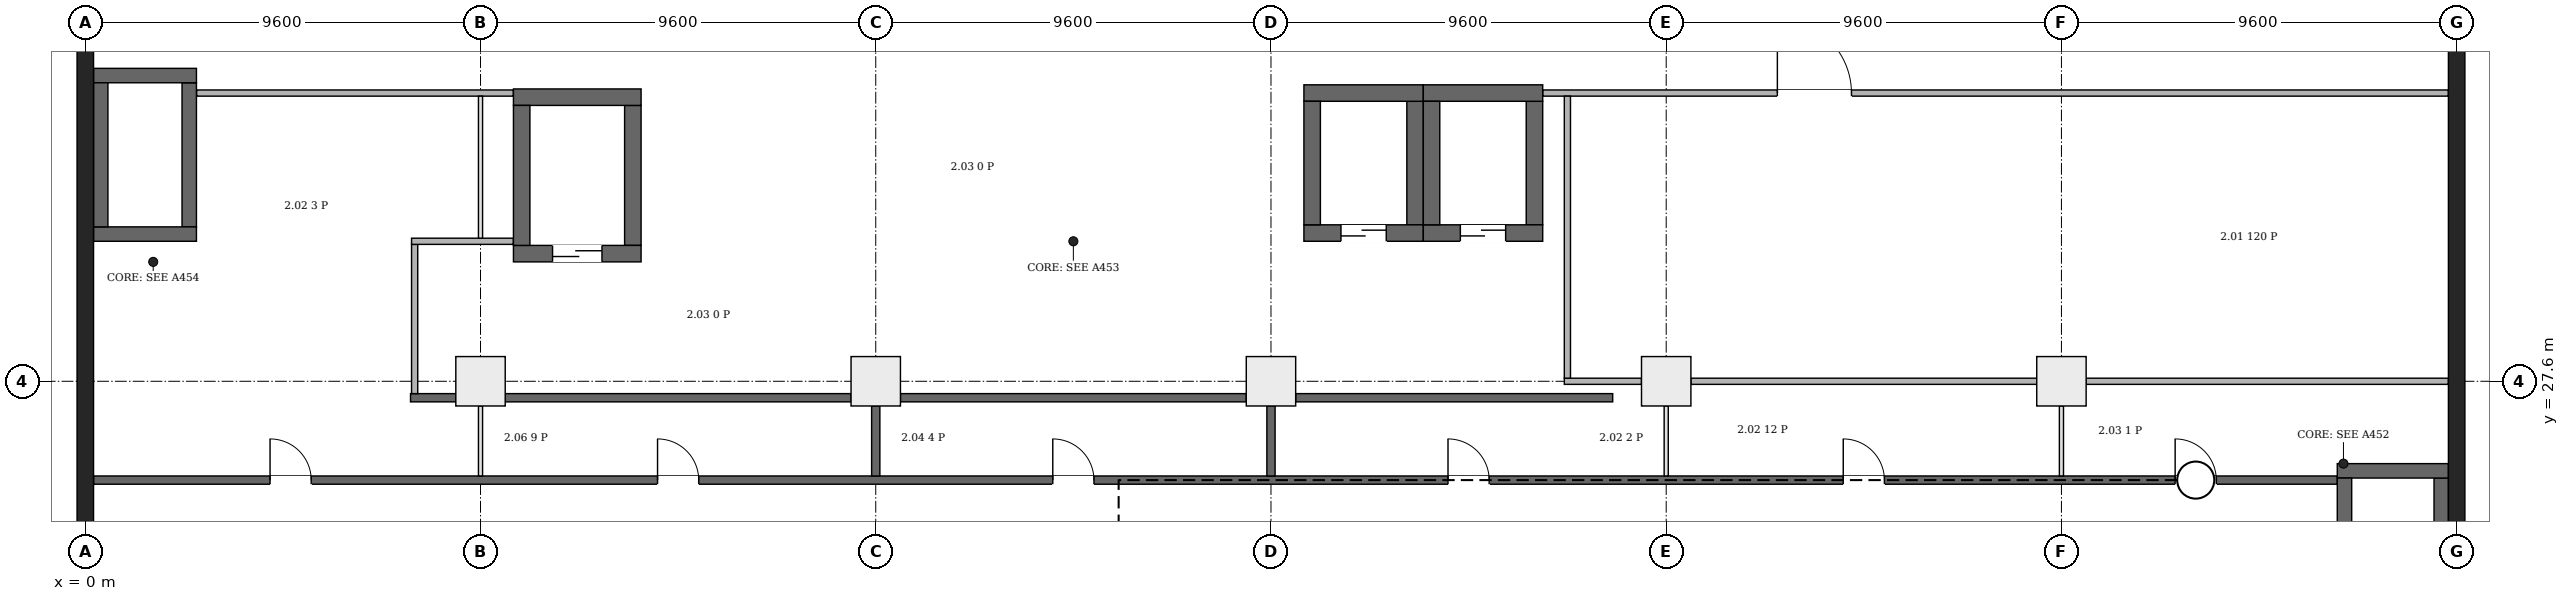
"""IFC4 building model, lengths in metres.
Left out: names, types, materials, properties, quantities, classifications, styles, units other than length and angle.
Written with IfcOpenShell. Run it as: python <this file> out.ifc"""

import sys

from ifc_helpers import new_model, si_unit, direction, frame, frame_2d, origin, origin_2d, place, context, subcontext, project, spatial, rectangle, extrude, element, fill, save


model = new_model("IFC4")
c1 = context("Model", 3, precision=1e-05, world=origin(), true_north=direction((0.0, 1.0)))
c2 = subcontext(c1, "Body", "Model", "MODEL_VIEW")
j1 = project(units=[si_unit("LENGTHUNIT", "METRE"), si_unit("PLANEANGLEUNIT", "RADIAN")], contexts=[c1])
p1 = place(None, origin())
s1 = spatial("IfcSite", under=j1, at=p1, CompositionType="ELEMENT")
p2 = place(p1, origin())
s2 = spatial("IfcBuilding", under=s1, at=p2, CompositionType="ELEMENT")
p3 = place(p2, frame((0.0, 0.0, 14.2)))
s3 = spatial("IfcBuildingStorey", under=s2, at=p3, CompositionType="ELEMENT", Elevation=14.2)
for number, where, z_axis, x_axis in (
    (1, (0.0, -0.2, 0.0), (0.0, 0.0, 1.0), (0.0, 1.0, 0.0)),
    (2, (57.6, -0.2, 0.0), (0.0, 0.0, 1.0), (0.0, 1.0, 0.0)),
):
    element("IfcWall", number, at=place(p3, frame(where, z_axis=z_axis, x_axis=x_axis)), inside=s3, PredefinedType="SHEAR", context=c2, shape_type="SweptSolid", body=[
        extrude(rectangle(XDim=46.88, YDim=0.4, at=frame_2d((23.44, 0.0))), origin(), (0.0, 0.0, 1.0), 7.5),
    ])
for number, where, z_axis, x_axis in (
    (3, (0.2, 31.175, 0.0), (0.0, 0.0, 1.0), (1.0, 0.0, 0.0)),
    (4, (0.2, 35.025, 0.0), (0.0, 0.0, 1.0), (1.0, 0.0, 0.0)),
):
    element("IfcWall", number, at=place(p3, frame(where, z_axis=z_axis, x_axis=x_axis)), inside=s3, PredefinedType="SHEAR", context=c2, shape_type="SweptSolid", body=[
        extrude(rectangle(XDim=2.5, YDim=0.35, at=frame_2d((1.25, 0.0))), origin(), (0.0, 0.0, 1.0), 7.5),
    ])
for number, where, z_axis, x_axis in (
    (5, (0.375, 31.35, 0.0), (0.0, 0.0, 1.0), (0.0, 1.0, 0.0)),
    (6, (2.525, 31.35, 0.0), (0.0, 0.0, 1.0), (0.0, 1.0, 0.0)),
):
    element("IfcWall", number, at=place(p3, frame(where, z_axis=z_axis, x_axis=x_axis)), inside=s3, PredefinedType="SHEAR", context=c2, shape_type="SweptSolid", body=[
        extrude(rectangle(XDim=3.5, YDim=0.35, at=frame_2d((1.75, 0.0))), origin(), (0.0, 0.0, 1.0), 7.5),
    ])
p4 = place(p3, frame((54.7, 25.425, 0.0), z_axis=(0.0, 0.0, 1.0), x_axis=(1.0, 0.0, 0.0)))
e7 = element("IfcWall", 7, at=p4, inside=s3, PredefinedType="SHEAR", context=c2, shape_type="SweptSolid", body=[
    extrude(rectangle(XDim=2.7, YDim=0.35, at=frame_2d((1.35, 0.0))), origin(), (0.0, 0.0, 1.0), 7.5),
])
for number, where, z_axis, x_axis in (
    (8, (54.875, 21.75, 0.0), (0.0, 0.0, 1.0), (0.0, 1.0, 0.0)),
    (9, (57.225, 21.75, 0.0), (0.0, 0.0, 1.0), (0.0, 1.0, 0.0)),
):
    element("IfcWall", number, at=place(p3, frame(where, z_axis=z_axis, x_axis=x_axis)), inside=s3, PredefinedType="SHEAR", context=c2, shape_type="SweptSolid", body=[
        extrude(rectangle(XDim=3.5, YDim=0.35, at=frame_2d((1.75, 0.0))), origin(), (0.0, 0.0, 1.0), 7.5),
    ])
p5 = place(p3, frame((10.4, 30.7, 0.0), z_axis=(0.0, 0.0, 1.0), x_axis=(1.0, 0.0, 0.0)))
e10 = element("IfcWall", 10, at=p5, inside=s3, PredefinedType="SHEAR", context=c2, shape_type="SweptSolid", body=[
    extrude(rectangle(XDim=3.1, YDim=0.4, at=frame_2d((1.55, 0.0))), origin(), (0.0, 0.0, 1.0), 7.5),
])
p6 = place(p5, frame((0.95, 0.0, 0.0)))
e11 = element("IfcOpeningElement", 11, at=p6, cuts=e10, PredefinedType="OPENING", context=c2, shape_type="SweptSolid", body=[
    extrude(rectangle(XDim=1.2, YDim=2.1, at=frame_2d((0.6, 1.05))), frame((0.0, 0.21, 0.0), z_axis=(0.0, -1.0, 0.0), x_axis=(1.0, 0.0, 0.0)), (0.0, 0.0, 1.0), 0.42),
])
p7 = place(p3, frame((10.4, 34.5, 0.0), z_axis=(0.0, 0.0, 1.0), x_axis=(1.0, 0.0, 0.0)))
e12 = element("IfcWall", 12, at=p7, inside=s3, PredefinedType="SHEAR", context=c2, shape_type="SweptSolid", body=[
    extrude(rectangle(XDim=3.1, YDim=0.4, at=frame_2d((1.55, 0.0))), origin(), (0.0, 0.0, 1.0), 7.5),
])
for number, where, z_axis, x_axis in (
    (13, (10.6, 30.9, 0.0), (0.0, 0.0, 1.0), (0.0, 1.0, 0.0)),
    (14, (13.3, 30.9, 0.0), (0.0, 0.0, 1.0), (0.0, 1.0, 0.0)),
):
    element("IfcWall", number, at=place(p3, frame(where, z_axis=z_axis, x_axis=x_axis)), inside=s3, PredefinedType="SHEAR", context=c2, shape_type="SweptSolid", body=[
        extrude(rectangle(XDim=3.4, YDim=0.4, at=frame_2d((1.7, 0.0))), origin(), (0.0, 0.0, 1.0), 7.5),
    ])
p8 = place(p3, frame((29.6, 31.2, 0.0), z_axis=(0.0, 0.0, 1.0), x_axis=(1.0, 0.0, 0.0)))
e15 = element("IfcWall", 15, at=p8, inside=s3, PredefinedType="SHEAR", context=c2, shape_type="SweptSolid", body=[
    extrude(rectangle(XDim=2.9, YDim=0.4, at=frame_2d((1.45, 0.0))), origin(), (0.0, 0.0, 1.0), 7.5),
])
p9 = place(p8, frame((0.9, 0.0, 0.0)))
e16 = element("IfcOpeningElement", 16, at=p9, cuts=e15, PredefinedType="OPENING", context=c2, shape_type="SweptSolid", body=[
    extrude(rectangle(XDim=1.1, YDim=2.1, at=frame_2d((0.55, 1.05))), frame((0.0, 0.21, 0.0), z_axis=(0.0, -1.0, 0.0), x_axis=(1.0, 0.0, 0.0)), (0.0, 0.0, 1.0), 0.42),
])
p10 = place(p3, frame((29.6, 34.6, 0.0), z_axis=(0.0, 0.0, 1.0), x_axis=(1.0, 0.0, 0.0)))
e17 = element("IfcWall", 17, at=p10, inside=s3, PredefinedType="SHEAR", context=c2, shape_type="SweptSolid", body=[
    extrude(rectangle(XDim=2.9, YDim=0.4, at=frame_2d((1.45, 0.0))), origin(), (0.0, 0.0, 1.0), 7.5),
])
for number, where, z_axis, x_axis in (
    (18, (29.8, 31.4, 0.0), (0.0, 0.0, 1.0), (0.0, 1.0, 0.0)),
    (19, (32.3, 31.4, 0.0), (0.0, 0.0, 1.0), (0.0, 1.0, 0.0)),
):
    element("IfcWall", number, at=place(p3, frame(where, z_axis=z_axis, x_axis=x_axis)), inside=s3, PredefinedType="SHEAR", context=c2, shape_type="SweptSolid", body=[
        extrude(rectangle(XDim=3.0, YDim=0.4, at=frame_2d((1.5, 0.0))), origin(), (0.0, 0.0, 1.0), 7.5),
    ])
p11 = place(p3, frame((32.5, 31.2, 0.0), z_axis=(0.0, 0.0, 1.0), x_axis=(1.0, 0.0, 0.0)))
e20 = element("IfcWall", 20, at=p11, inside=s3, PredefinedType="SHEAR", context=c2, shape_type="SweptSolid", body=[
    extrude(rectangle(XDim=2.9, YDim=0.4, at=frame_2d((1.45, 0.0))), origin(), (0.0, 0.0, 1.0), 7.5),
])
p12 = place(p11, frame((0.9, 0.0, 0.0)))
e21 = element("IfcOpeningElement", 21, at=p12, cuts=e20, PredefinedType="OPENING", context=c2, shape_type="SweptSolid", body=[
    extrude(rectangle(XDim=1.1, YDim=2.1, at=frame_2d((0.55, 1.05))), frame((0.0, 0.21, 0.0), z_axis=(0.0, -1.0, 0.0), x_axis=(1.0, 0.0, 0.0)), (0.0, 0.0, 1.0), 0.42),
])
p13 = place(p3, frame((32.5, 34.6, 0.0), z_axis=(0.0, 0.0, 1.0), x_axis=(1.0, 0.0, 0.0)))
e22 = element("IfcWall", 22, at=p13, inside=s3, PredefinedType="SHEAR", context=c2, shape_type="SweptSolid", body=[
    extrude(rectangle(XDim=2.9, YDim=0.4, at=frame_2d((1.45, 0.0))), origin(), (0.0, 0.0, 1.0), 7.5),
])
for number, where, z_axis, x_axis in (
    (23, (32.7, 31.4, 0.0), (0.0, 0.0, 1.0), (0.0, 1.0, 0.0)),
    (24, (35.2, 31.4, 0.0), (0.0, 0.0, 1.0), (0.0, 1.0, 0.0)),
):
    element("IfcWall", number, at=place(p3, frame(where, z_axis=z_axis, x_axis=x_axis)), inside=s3, PredefinedType="SHEAR", context=c2, shape_type="SweptSolid", body=[
        extrude(rectangle(XDim=3.0, YDim=0.4, at=frame_2d((1.5, 0.0))), origin(), (0.0, 0.0, 1.0), 7.5),
    ])
for number, where, z_axis, x_axis in (
    (25, (9.6, 27.6, 0.0), (0.0, 0.0, 1.0), (1.0, 0.0, 0.0)),
    (26, (19.2, 27.6, 0.0), (0.0, 0.0, 1.0), (1.0, 0.0, 0.0)),
    (27, (28.8, 27.6, 0.0), (0.0, 0.0, 1.0), (1.0, 0.0, 0.0)),
    (28, (38.4, 27.6, 0.0), (0.0, 0.0, 1.0), (1.0, 0.0, 0.0)),
    (29, (48.0, 27.6, 0.0), (0.0, 0.0, 1.0), (1.0, 0.0, 0.0)),
):
    element("IfcColumn", number, at=place(p3, frame(where, z_axis=z_axis, x_axis=x_axis)), inside=s3, PredefinedType="COLUMN", context=c2, shape_type="SweptSolid", body=[
        extrude(rectangle(XDim=1.2, YDim=1.2, at=origin_2d()), origin(), (0.0, 0.0, 1.0), 7.5),
    ])
p14 = place(p3, frame((0.206, 25.2, 0.0), z_axis=(0.0, 0.0, 1.0), x_axis=(1.0, 0.0, 0.0)))
e30 = element("IfcWall", 30, at=p14, inside=s3, PredefinedType="PARTITIONING", context=c2, shape_type="SweptSolid", body=[
    extrude(rectangle(XDim=54.488, YDim=0.2, at=frame_2d((27.244, 0.0))), origin(), (0.0, 0.0, 1.0), 7.15),
])
p15 = place(p14, frame((4.282, 0.0, 0.0)))
e31 = element("IfcOpeningElement", 31, at=p15, cuts=e30, PredefinedType="OPENING", context=c2, shape_type="SweptSolid", body=[
    extrude(rectangle(XDim=1.0, YDim=2.1, at=frame_2d((0.5, 1.05))), frame((0.0, 0.11, 0.0), z_axis=(0.0, -1.0, 0.0), x_axis=(1.0, 0.0, 0.0)), (0.0, 0.0, 1.0), 0.22),
])
p16 = place(p14, frame((13.694, 0.0, 0.0)))
e32 = element("IfcOpeningElement", 32, at=p16, cuts=e30, PredefinedType="OPENING", context=c2, shape_type="SweptSolid", body=[
    extrude(rectangle(XDim=1.0, YDim=2.1, at=frame_2d((0.5, 1.05))), frame((0.0, 0.11, 0.0), z_axis=(0.0, -1.0, 0.0), x_axis=(1.0, 0.0, 0.0)), (0.0, 0.0, 1.0), 0.22),
])
p17 = place(p14, frame((23.294, 0.0, 0.0)))
e33 = element("IfcOpeningElement", 33, at=p17, cuts=e30, PredefinedType="OPENING", context=c2, shape_type="SweptSolid", body=[
    extrude(rectangle(XDim=1.0, YDim=2.1, at=frame_2d((0.5, 1.05))), frame((0.0, 0.11, 0.0), z_axis=(0.0, -1.0, 0.0), x_axis=(1.0, 0.0, 0.0)), (0.0, 0.0, 1.0), 0.22),
])
p18 = place(p14, frame((32.894, 0.0, 0.0)))
e34 = element("IfcOpeningElement", 34, at=p18, cuts=e30, PredefinedType="OPENING", context=c2, shape_type="SweptSolid", body=[
    extrude(rectangle(XDim=1.0, YDim=2.1, at=frame_2d((0.5, 1.05))), frame((0.0, 0.11, 0.0), z_axis=(0.0, -1.0, 0.0), x_axis=(1.0, 0.0, 0.0)), (0.0, 0.0, 1.0), 0.22),
])
p19 = place(p14, frame((42.494, 0.0, 0.0)))
e35 = element("IfcOpeningElement", 35, at=p19, cuts=e30, PredefinedType="OPENING", context=c2, shape_type="SweptSolid", body=[
    extrude(rectangle(XDim=1.0, YDim=2.1, at=frame_2d((0.5, 1.05))), frame((0.0, 0.11, 0.0), z_axis=(0.0, -1.0, 0.0), x_axis=(1.0, 0.0, 0.0)), (0.0, 0.0, 1.0), 0.22),
])
p20 = place(p14, frame((50.556, 0.0, 0.0)))
e36 = element("IfcOpeningElement", 36, at=p20, cuts=e30, PredefinedType="OPENING", context=c2, shape_type="SweptSolid", body=[
    extrude(rectangle(XDim=1.0, YDim=2.1, at=frame_2d((0.5, 1.05))), frame((0.0, 0.11, 0.0), z_axis=(0.0, -1.0, 0.0), x_axis=(1.0, 0.0, 0.0)), (0.0, 0.0, 1.0), 0.22),
])
p21 = place(p3, frame((2.706, 34.6, 0.0), z_axis=(0.0, 0.0, 1.0), x_axis=(1.0, 0.0, 0.0)))
e37 = element("IfcWall", 37, at=p21, inside=s3, PredefinedType="PARTITIONING", context=c2, shape_type="SweptSolid", body=[
    extrude(rectangle(XDim=7.688, YDim=0.15, at=frame_2d((3.844, 0.0))), origin(), (0.0, 0.0, 1.0), 7.15),
])
p22 = place(p3, frame((7.9, 27.2, 0.0), z_axis=(0.0, 0.0, 1.0), x_axis=(1.0, 0.0, 0.0)))
e38 = element("IfcWall", 38, at=p22, inside=s3, PredefinedType="PARTITIONING", context=c2, shape_type="SweptSolid", body=[
    extrude(rectangle(XDim=1.1, YDim=0.2, at=frame_2d((0.55, 0.0))), origin(), (0.0, 0.0, 1.0), 7.15),
])
p23 = place(p3, frame((8.0, 27.3, 0.0), z_axis=(0.0, 0.0, 1.0), x_axis=(0.0, 1.0, 0.0)))
e39 = element("IfcWall", 39, at=p23, inside=s3, PredefinedType="PARTITIONING", context=c2, shape_type="SweptSolid", body=[
    extrude(rectangle(XDim=3.625, YDim=0.15, at=frame_2d((1.812, 0.0))), origin(), (0.0, 0.0, 1.0), 7.15),
])
p24 = place(p3, frame((7.925, 31.0, 0.0), z_axis=(0.0, 0.0, 1.0), x_axis=(1.0, 0.0, 0.0)))
e40 = element("IfcWall", 40, at=p24, inside=s3, PredefinedType="PARTITIONING", context=c2, shape_type="SweptSolid", body=[
    extrude(rectangle(XDim=2.469, YDim=0.15, at=frame_2d((1.234, 0.0))), origin(), (0.0, 0.0, 1.0), 7.15),
])
p25 = place(p3, frame((9.6, 25.3, 0.0), z_axis=(0.0, 0.0, 1.0), x_axis=(0.0, 1.0, 0.0)))
e41 = element("IfcWall", 41, at=p25, inside=s3, PredefinedType="PARTITIONING", context=c2, shape_type="SweptSolid", body=[
    extrude(rectangle(XDim=1.7, YDim=0.1, at=frame_2d((0.85, 0.0))), origin(), (0.0, 0.0, 1.0), 6.75),
])
p26 = place(p3, frame((9.6, 31.075, 0.0), z_axis=(0.0, 0.0, 1.0), x_axis=(0.0, 1.0, 0.0)))
e42 = element("IfcWall", 42, at=p26, inside=s3, PredefinedType="PARTITIONING", context=c2, shape_type="SweptSolid", body=[
    extrude(rectangle(XDim=3.45, YDim=0.1, at=frame_2d((1.725, 0.0))), origin(), (0.0, 0.0, 1.0), 6.75),
])
p27 = place(p3, frame((10.2, 27.2, 0.0), z_axis=(0.0, 0.0, 1.0), x_axis=(1.0, 0.0, 0.0)))
e43 = element("IfcWall", 43, at=p27, inside=s3, PredefinedType="PARTITIONING", context=c2, shape_type="SweptSolid", body=[
    extrude(rectangle(XDim=8.4, YDim=0.2, at=frame_2d((4.2, 0.0))), origin(), (0.0, 0.0, 1.0), 7.15),
])
p28 = place(p3, frame((19.2, 25.3, 0.0), z_axis=(0.0, 0.0, 1.0), x_axis=(0.0, 1.0, 0.0)))
e44 = element("IfcWall", 44, at=p28, inside=s3, PredefinedType="PARTITIONING", context=c2, shape_type="SweptSolid", body=[
    extrude(rectangle(XDim=1.7, YDim=0.2, at=frame_2d((0.85, 0.0))), origin(), (0.0, 0.0, 1.0), 6.75),
])
p29 = place(p3, frame((19.8, 27.2, 0.0), z_axis=(0.0, 0.0, 1.0), x_axis=(1.0, 0.0, 0.0)))
e45 = element("IfcWall", 45, at=p29, inside=s3, PredefinedType="PARTITIONING", context=c2, shape_type="SweptSolid", body=[
    extrude(rectangle(XDim=8.4, YDim=0.2, at=frame_2d((4.2, 0.0))), origin(), (0.0, 0.0, 1.0), 7.15),
])
p30 = place(p3, frame((28.8, 25.3, 0.0), z_axis=(0.0, 0.0, 1.0), x_axis=(0.0, 1.0, 0.0)))
e46 = element("IfcWall", 46, at=p30, inside=s3, PredefinedType="PARTITIONING", context=c2, shape_type="SweptSolid", body=[
    extrude(rectangle(XDim=1.7, YDim=0.2, at=frame_2d((0.85, 0.0))), origin(), (0.0, 0.0, 1.0), 6.75),
])
p31 = place(p3, frame((29.4, 27.2, 0.0), z_axis=(0.0, 0.0, 1.0), x_axis=(1.0, 0.0, 0.0)))
e47 = element("IfcWall", 47, at=p31, inside=s3, PredefinedType="PARTITIONING", context=c2, shape_type="SweptSolid", body=[
    extrude(rectangle(XDim=7.7, YDim=0.2, at=frame_2d((3.85, 0.0))), origin(), (0.0, 0.0, 1.0), 7.15),
])
p32 = place(p3, frame((35.406, 34.6, 0.0), z_axis=(0.0, 0.0, 1.0), x_axis=(1.0, 0.0, 0.0)))
e48 = element("IfcWall", 48, at=p32, inside=s3, PredefinedType="PARTITIONING", context=c2, shape_type="SweptSolid", body=[
    extrude(rectangle(XDim=21.988, YDim=0.15, at=frame_2d((10.994, 0.0))), origin(), (0.0, 0.0, 1.0), 7.15),
])
p33 = place(p32, frame((5.694, 0.0, 0.0)))
e49 = element("IfcOpeningElement", 49, at=p33, cuts=e48, PredefinedType="OPENING", context=c2, shape_type="SweptSolid", body=[
    extrude(rectangle(XDim=1.8, YDim=2.1, at=frame_2d((0.9, 1.05))), frame((0.0, 0.085, 0.0), z_axis=(0.0, -1.0, 0.0), x_axis=(1.0, 0.0, 0.0)), (0.0, 0.0, 1.0), 0.17),
])
p34 = place(p3, frame((35.925, 27.6, 0.0), z_axis=(0.0, 0.0, 1.0), x_axis=(1.0, 0.0, 0.0)))
e50 = element("IfcWall", 50, at=p34, inside=s3, PredefinedType="PARTITIONING", context=c2, shape_type="SweptSolid", body=[
    extrude(rectangle(XDim=1.875, YDim=0.15, at=frame_2d((0.938, 0.0))), origin(), (0.0, 0.0, 1.0), 6.45),
])
p35 = place(p3, frame((36.0, 27.675, 0.0), z_axis=(0.0, 0.0, 1.0), x_axis=(0.0, 1.0, 0.0)))
e51 = element("IfcWall", 51, at=p35, inside=s3, PredefinedType="PARTITIONING", context=c2, shape_type="SweptSolid", body=[
    extrude(rectangle(XDim=6.85, YDim=0.15, at=frame_2d((3.425, 0.0))), origin(), (0.0, 0.0, 1.0), 7.15),
])
p36 = place(p3, frame((38.4, 25.3, 0.0), z_axis=(0.0, 0.0, 1.0), x_axis=(0.0, 1.0, 0.0)))
e52 = element("IfcWall", 52, at=p36, inside=s3, PredefinedType="PARTITIONING", context=c2, shape_type="SweptSolid", body=[
    extrude(rectangle(XDim=1.7, YDim=0.1, at=frame_2d((0.85, 0.0))), origin(), (0.0, 0.0, 1.0), 6.75),
])
p37 = place(p3, frame((39.0, 27.6, 0.0), z_axis=(0.0, 0.0, 1.0), x_axis=(1.0, 0.0, 0.0)))
e53 = element("IfcWall", 53, at=p37, inside=s3, PredefinedType="PARTITIONING", context=c2, shape_type="SweptSolid", body=[
    extrude(rectangle(XDim=8.4, YDim=0.15, at=frame_2d((4.2, 0.0))), origin(), (0.0, 0.0, 1.0), 6.45),
])
p38 = place(p3, frame((48.0, 25.3, 0.0), z_axis=(0.0, 0.0, 1.0), x_axis=(0.0, 1.0, 0.0)))
e54 = element("IfcWall", 54, at=p38, inside=s3, PredefinedType="PARTITIONING", context=c2, shape_type="SweptSolid", body=[
    extrude(rectangle(XDim=1.7, YDim=0.1, at=frame_2d((0.85, 0.0))), origin(), (0.0, 0.0, 1.0), 6.75),
])
p39 = place(p3, frame((48.6, 27.6, 0.0), z_axis=(0.0, 0.0, 1.0), x_axis=(1.0, 0.0, 0.0)))
e55 = element("IfcWall", 55, at=p39, inside=s3, PredefinedType="PARTITIONING", context=c2, shape_type="SweptSolid", body=[
    extrude(rectangle(XDim=8.794, YDim=0.15, at=frame_2d((4.397, 0.0))), origin(), (0.0, 0.0, 1.0), 6.45),
])
p40 = place(p6, origin())
e56 = element("IfcDoor", 56, at=p40, inside=s3, OperationType="DOUBLE_DOOR_SLIDING", PredefinedType="DOOR", context=c2, shape_type="SweptSolid", body=[
    extrude(rectangle(XDim=1.2, YDim=2.1, at=frame_2d((0.6, 1.05))), frame((0.0, 0.025, 0.0), z_axis=(0.0, -1.0, 0.0), x_axis=(1.0, 0.0, 0.0)), (0.0, 0.0, 1.0), 0.05),
])
fill(e11, e56)
p41 = place(p9, origin())
e57 = element("IfcDoor", 57, at=p41, inside=s3, OperationType="DOUBLE_DOOR_SLIDING", PredefinedType="DOOR", context=c2, shape_type="SweptSolid", body=[
    extrude(rectangle(XDim=1.1, YDim=2.1, at=frame_2d((0.55, 1.05))), frame((0.0, 0.025, 0.0), z_axis=(0.0, -1.0, 0.0), x_axis=(1.0, 0.0, 0.0)), (0.0, 0.0, 1.0), 0.05),
])
fill(e16, e57)
p42 = place(p12, origin())
e58 = element("IfcDoor", 58, at=p42, inside=s3, OperationType="DOUBLE_DOOR_SLIDING", PredefinedType="DOOR", context=c2, shape_type="SweptSolid", body=[
    extrude(rectangle(XDim=1.1, YDim=2.1, at=frame_2d((0.55, 1.05))), frame((0.0, 0.025, 0.0), z_axis=(0.0, -1.0, 0.0), x_axis=(1.0, 0.0, 0.0)), (0.0, 0.0, 1.0), 0.05),
])
fill(e21, e58)
p43 = place(p15, origin())
e59 = element("IfcDoor", 59, at=p43, inside=s3, OperationType="SINGLE_SWING_LEFT", PredefinedType="DOOR", context=c2, shape_type="SweptSolid", body=[
    extrude(rectangle(XDim=1.0, YDim=2.1, at=frame_2d((0.5, 1.05))), frame((0.0, 0.025, 0.0), z_axis=(0.0, -1.0, 0.0), x_axis=(1.0, 0.0, 0.0)), (0.0, 0.0, 1.0), 0.05),
])
fill(e31, e59)
p44 = place(p16, origin())
e60 = element("IfcDoor", 60, at=p44, inside=s3, OperationType="SINGLE_SWING_LEFT", PredefinedType="DOOR", context=c2, shape_type="SweptSolid", body=[
    extrude(rectangle(XDim=1.0, YDim=2.1, at=frame_2d((0.5, 1.05))), frame((0.0, 0.025, 0.0), z_axis=(0.0, -1.0, 0.0), x_axis=(1.0, 0.0, 0.0)), (0.0, 0.0, 1.0), 0.05),
])
fill(e32, e60)
p45 = place(p17, origin())
e61 = element("IfcDoor", 61, at=p45, inside=s3, OperationType="SINGLE_SWING_RIGHT", PredefinedType="DOOR", context=c2, shape_type="SweptSolid", body=[
    extrude(rectangle(XDim=1.0, YDim=2.1, at=frame_2d((0.5, 1.05))), frame((0.0, 0.025, 0.0), z_axis=(0.0, -1.0, 0.0), x_axis=(1.0, 0.0, 0.0)), (0.0, 0.0, 1.0), 0.05),
])
fill(e33, e61)
p46 = place(p18, origin())
e62 = element("IfcDoor", 62, at=p46, inside=s3, OperationType="SINGLE_SWING_RIGHT", PredefinedType="DOOR", context=c2, shape_type="SweptSolid", body=[
    extrude(rectangle(XDim=1.0, YDim=2.1, at=frame_2d((0.5, 1.05))), frame((0.0, 0.025, 0.0), z_axis=(0.0, -1.0, 0.0), x_axis=(1.0, 0.0, 0.0)), (0.0, 0.0, 1.0), 0.05),
])
fill(e34, e62)
p47 = place(p19, origin())
e63 = element("IfcDoor", 63, at=p47, inside=s3, OperationType="SINGLE_SWING_RIGHT", PredefinedType="DOOR", context=c2, shape_type="SweptSolid", body=[
    extrude(rectangle(XDim=1.0, YDim=2.1, at=frame_2d((0.5, 1.05))), frame((0.0, 0.025, 0.0), z_axis=(0.0, -1.0, 0.0), x_axis=(1.0, 0.0, 0.0)), (0.0, 0.0, 1.0), 0.05),
])
fill(e35, e63)
p48 = place(p20, origin())
e64 = element("IfcDoor", 64, at=p48, inside=s3, OperationType="SINGLE_SWING_RIGHT", PredefinedType="DOOR", context=c2, shape_type="SweptSolid", body=[
    extrude(rectangle(XDim=1.0, YDim=2.1, at=frame_2d((0.5, 1.05))), frame((0.0, 0.025, 0.0), z_axis=(0.0, -1.0, 0.0), x_axis=(1.0, 0.0, 0.0)), (0.0, 0.0, 1.0), 0.05),
])
fill(e36, e64)
p49 = place(p33, origin())
e65 = element("IfcDoor", 65, at=p49, inside=s3, OperationType="DOUBLE_DOOR_SINGLE_SWING", PredefinedType="DOOR", context=c2, shape_type="SweptSolid", body=[
    extrude(rectangle(XDim=1.8, YDim=2.1, at=frame_2d((0.9, 1.05))), frame((0.0, 0.025, 0.0), z_axis=(0.0, -1.0, 0.0), x_axis=(1.0, 0.0, 0.0)), (0.0, 0.0, 1.0), 0.05),
])
fill(e49, e65)
save(model, sys.argv[1])
